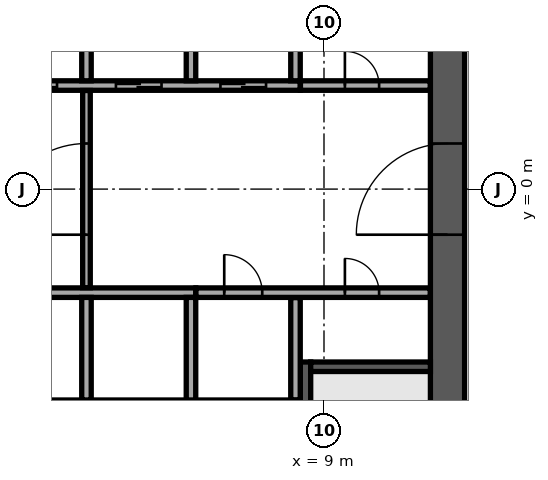
"""IFC4 building model, lengths in metres.
Left out: names, types, materials, properties, quantities, classifications, styles, units other than length and angle.
Written with IfcOpenShell. Run it as: python <this file> out.ifc"""

import sys

from ifc_helpers import new_model, si_unit, direction, frame, frame_2d, origin, place, context, subcontext, project, spatial, rectangle, extrude, element, fill, save


model = new_model("IFC4")
c1 = context("Model", 3, precision=1e-05, world=origin(), true_north=direction((0.0, 1.0)))
c2 = subcontext(c1, "Body", "Model", "MODEL_VIEW")
j1 = project(units=[si_unit("LENGTHUNIT", "METRE"), si_unit("PLANEANGLEUNIT", "RADIAN")], contexts=[c1])
p1 = place(None, origin())
s1 = spatial("IfcSite", under=j1, at=p1, CompositionType="ELEMENT")
p2 = place(p1, origin())
s2 = spatial("IfcBuilding", under=s1, at=p2, CompositionType="ELEMENT")
p3 = place(p2, frame((0.0, 0.0, 205.3)))
s3 = spatial("IfcBuildingStorey", under=s2, at=p3, CompositionType="ELEMENT", Elevation=205.3)
p4 = place(p3, frame((12.25, -11.8, 0.0), z_axis=(0.0, 0.0, 1.0), x_axis=(0.0, 1.0, 0.0)))
e1 = element("IfcWall", 1, at=p4, inside=s3, PredefinedType="SHEAR", context=c2, shape_type="SweptSolid", body=[
    extrude(rectangle(XDim=23.6, YDim=0.9, at=frame_2d((11.8, 0.0))), origin(), (0.0, 0.0, 1.0), 3.62),
])
p5 = place(p4, frame((10.6, 0.0, 0.0)))
e2 = element("IfcOpeningElement", 2, at=p5, cuts=e1, PredefinedType="OPENING", context=c2, shape_type="SweptSolid", body=[
    extrude(rectangle(XDim=2.4, YDim=2.4, at=frame_2d((1.2, 1.2))), frame((0.0, 0.46, 0.0), z_axis=(0.0, -1.0, 0.0), x_axis=(1.0, 0.0, 0.0)), (0.0, 0.0, 1.0), 0.92),
])
p6 = place(p3, frame((-2.875, -5.7, 0.0), z_axis=(0.0, 0.0, 1.0), x_axis=(1.0, 0.0, 0.0)))
e3 = element("IfcWall", 3, at=p6, inside=s3, PredefinedType="SOLIDWALL", context=c2, shape_type="SweptSolid", body=[
    extrude(rectangle(XDim=11.25, YDim=0.3, at=frame_2d((5.625, 0.0))), origin(), (0.0, 0.0, 1.0), 3.62),
])
p7 = place(p3, frame((-8.375, 2.725, 0.0), z_axis=(0.0, 0.0, 1.0), x_axis=(1.0, 0.0, 0.0)))
e4 = element("IfcWall", 4, at=p7, inside=s3, PredefinedType="SOLIDWALL", context=c2, shape_type="SweptSolid", body=[
    extrude(rectangle(XDim=16.75, YDim=0.25, at=frame_2d((8.375, 0.0))), origin(), (0.0, 0.0, 1.0), 3.62),
])
p8 = place(p7, frame((0.9, 0.0, 0.0)))
e5 = element("IfcOpeningElement", 5, at=p8, cuts=e4, PredefinedType="OPENING", context=c2, shape_type="SweptSolid", body=[
    extrude(rectangle(XDim=1.2, YDim=2.1, at=frame_2d((0.6, 1.05))), frame((0.0, 0.135, 0.0), z_axis=(0.0, -1.0, 0.0), x_axis=(1.0, 0.0, 0.0)), (0.0, 0.0, 1.0), 0.27),
])
p9 = place(p7, frame((3.65, 0.0, 0.0)))
e6 = element("IfcOpeningElement", 6, at=p9, cuts=e4, PredefinedType="OPENING", context=c2, shape_type="SweptSolid", body=[
    extrude(rectangle(XDim=1.2, YDim=2.1, at=frame_2d((0.6, 1.05))), frame((0.0, 0.135, 0.0), z_axis=(0.0, -1.0, 0.0), x_axis=(1.0, 0.0, 0.0)), (0.0, 0.0, 1.0), 0.27),
])
p10 = place(p7, frame((6.4, 0.0, 0.0)))
e7 = element("IfcOpeningElement", 7, at=p10, cuts=e4, PredefinedType="OPENING", context=c2, shape_type="SweptSolid", body=[
    extrude(rectangle(XDim=1.2, YDim=2.1, at=frame_2d((0.6, 1.05))), frame((0.0, 0.135, 0.0), z_axis=(0.0, -1.0, 0.0), x_axis=(1.0, 0.0, 0.0)), (0.0, 0.0, 1.0), 0.27),
])
p11 = place(p7, frame((9.15, 0.0, 0.0)))
e8 = element("IfcOpeningElement", 8, at=p11, cuts=e4, PredefinedType="OPENING", context=c2, shape_type="SweptSolid", body=[
    extrude(rectangle(XDim=1.2, YDim=2.1, at=frame_2d((0.6, 1.05))), frame((0.0, 0.135, 0.0), z_axis=(0.0, -1.0, 0.0), x_axis=(1.0, 0.0, 0.0)), (0.0, 0.0, 1.0), 0.27),
])
p12 = place(p7, frame((11.9, 0.0, 0.0)))
e9 = element("IfcOpeningElement", 9, at=p12, cuts=e4, PredefinedType="OPENING", context=c2, shape_type="SweptSolid", body=[
    extrude(rectangle(XDim=1.2, YDim=2.1, at=frame_2d((0.6, 1.05))), frame((0.0, 0.135, 0.0), z_axis=(0.0, -1.0, 0.0), x_axis=(1.0, 0.0, 0.0)), (0.0, 0.0, 1.0), 0.27),
])
p13 = place(p7, frame((14.65, 0.0, 0.0)))
e10 = element("IfcOpeningElement", 10, at=p13, cuts=e4, PredefinedType="OPENING", context=c2, shape_type="SweptSolid", body=[
    extrude(rectangle(XDim=1.2, YDim=2.1, at=frame_2d((0.6, 1.05))), frame((0.0, 0.135, 0.0), z_axis=(0.0, -1.0, 0.0), x_axis=(1.0, 0.0, 0.0)), (0.0, 0.0, 1.0), 0.27),
])
for number, where, z_axis, x_axis in (
    (11, (2.75, 2.85, 0.0), (0.0, 0.0, 1.0), (0.0, 1.0, 0.0)),
    (12, (5.5, 2.85, 0.0), (0.0, 0.0, 1.0), (0.0, 1.0, 0.0)),
    (13, (8.25, 2.85, 0.0), (0.0, 0.0, 1.0), (0.0, 1.0, 0.0)),
):
    element("IfcWall", number, at=place(p3, frame(where, z_axis=z_axis, x_axis=x_axis)), inside=s3, PredefinedType="SOLIDWALL", context=c2, shape_type="SweptSolid", body=[
        extrude(rectangle(XDim=2.7, YDim=0.25, at=frame_2d((1.35, 0.0))), origin(), (0.0, 0.0, 1.0), 3.62),
    ])
p14 = place(p3, frame((-2.875, -2.725, 0.0), z_axis=(0.0, 0.0, 1.0), x_axis=(1.0, 0.0, 0.0)))
e14 = element("IfcWall", 14, at=p14, inside=s3, PredefinedType="SOLIDWALL", context=c2, shape_type="SweptSolid", body=[
    extrude(rectangle(XDim=8.5, YDim=0.25, at=frame_2d((4.25, 0.0))), origin(), (0.0, 0.0, 1.0), 3.62),
])
for number, where, z_axis, x_axis in (
    (15, (2.75, -5.55, 0.0), (0.0, 0.0, 1.0), (0.0, 1.0, 0.0)),
    (16, (5.5, -5.55, 0.0), (0.0, 0.0, 1.0), (0.0, 1.0, 0.0)),
):
    element("IfcWall", number, at=place(p3, frame(where, z_axis=z_axis, x_axis=x_axis)), inside=s3, PredefinedType="SOLIDWALL", context=c2, shape_type="SweptSolid", body=[
        extrude(rectangle(XDim=2.7, YDim=0.25, at=frame_2d((1.35, 0.0))), origin(), (0.0, 0.0, 1.0), 3.62),
    ])
p15 = place(p3, frame((8.512, -4.55, 0.0), z_axis=(0.0, 0.0, 1.0), x_axis=(0.0, -1.0, 0.0)))
e17 = element("IfcWall", 17, at=p15, inside=s3, PredefinedType="SOLIDWALL", context=c2, shape_type="SweptSolid", body=[
    extrude(rectangle(XDim=7.25, YDim=0.275, at=frame_2d((3.625, 0.0))), origin(), (0.0, 0.0, 1.0), 3.62),
])
p16 = place(p15, frame((6.0, 0.0, 0.0)))
e18 = element("IfcOpeningElement", 18, at=p16, cuts=e17, PredefinedType="OPENING", context=c2, shape_type="SweptSolid", body=[
    extrude(rectangle(XDim=1.0, YDim=2.1, at=frame_2d((0.5, 1.05))), frame((0.0, 0.147, 0.0), z_axis=(0.0, -1.0, 0.0), x_axis=(1.0, 0.0, 0.0)), (0.0, 0.0, 1.0), 0.295),
])
p17 = place(p3, frame((8.65, -4.675, 0.0), z_axis=(0.0, 0.0, 1.0), x_axis=(1.0, 0.0, 0.0)))
e19 = element("IfcWall", 19, at=p17, inside=s3, PredefinedType="SOLIDWALL", context=c2, shape_type="SweptSolid", body=[
    extrude(rectangle(XDim=3.15, YDim=0.25, at=frame_2d((1.575, 0.0))), origin(), (0.0, 0.0, 1.0), 3.62),
])
p18 = place(p3, frame((8.25, -5.545, 0.0), z_axis=(0.0, 0.0, 1.0), x_axis=(0.0, 1.0, 0.0)))
e20 = element("IfcWall", 20, at=p18, inside=s3, PredefinedType="PARTITIONING", context=c2, shape_type="SweptSolid", body=[
    extrude(rectangle(XDim=2.69, YDim=0.25, at=frame_2d((1.345, 0.0))), origin(), (0.0, 0.0, 1.0), 3.62),
])
p19 = place(p3, frame((5.63, -2.725, 0.0), z_axis=(0.0, 0.0, 1.0), x_axis=(1.0, 0.0, 0.0)))
e21 = element("IfcWall", 21, at=p19, inside=s3, PredefinedType="PARTITIONING", context=c2, shape_type="SweptSolid", body=[
    extrude(rectangle(XDim=6.165, YDim=0.25, at=frame_2d((3.083, 0.0))), origin(), (0.0, 0.0, 1.0), 3.62),
])
p20 = place(p19, frame((0.745, 0.0, 0.0)))
e22 = element("IfcOpeningElement", 22, at=p20, cuts=e21, PredefinedType="OPENING", context=c2, shape_type="SweptSolid", body=[
    extrude(rectangle(XDim=1.0, YDim=2.1, at=frame_2d((0.5, 1.05))), frame((0.0, 0.135, 0.0), z_axis=(0.0, -1.0, 0.0), x_axis=(1.0, 0.0, 0.0)), (0.0, 0.0, 1.0), 0.27),
])
p21 = place(p19, frame((3.92, 0.0, 0.0)))
e23 = element("IfcOpeningElement", 23, at=p21, cuts=e21, PredefinedType="OPENING", context=c2, shape_type="SweptSolid", body=[
    extrude(rectangle(XDim=0.9, YDim=2.1, at=frame_2d((0.45, 1.05))), frame((0.0, 0.135, 0.0), z_axis=(0.0, -1.0, 0.0), x_axis=(1.0, 0.0, 0.0)), (0.0, 0.0, 1.0), 0.27),
])
p22 = place(p3, frame((2.75, -2.595, 0.0), z_axis=(0.0, 0.0, 1.0), x_axis=(0.0, 1.0, 0.0)))
e24 = element("IfcWall", 24, at=p22, inside=s3, PredefinedType="PARTITIONING", context=c2, shape_type="SweptSolid", body=[
    extrude(rectangle(XDim=5.19, YDim=0.2, at=frame_2d((2.595, 0.0))), origin(), (0.0, 0.0, 1.0), 3.62),
])
p23 = place(p22, frame((1.395, 0.0, 0.0)))
e25 = element("IfcOpeningElement", 25, at=p23, cuts=e24, PredefinedType="OPENING", context=c2, shape_type="SweptSolid", body=[
    extrude(rectangle(XDim=2.4, YDim=2.4, at=frame_2d((1.2, 1.2))), frame((0.0, 0.11, 0.0), z_axis=(0.0, -1.0, 0.0), x_axis=(1.0, 0.0, 0.0)), (0.0, 0.0, 1.0), 0.22),
])
p24 = place(p3, frame((8.38, 2.725, 0.0), z_axis=(0.0, 0.0, 1.0), x_axis=(1.0, 0.0, 0.0)))
e26 = element("IfcWall", 26, at=p24, inside=s3, PredefinedType="PARTITIONING", context=c2, shape_type="SweptSolid", body=[
    extrude(rectangle(XDim=3.415, YDim=0.25, at=frame_2d((1.708, 0.0))), origin(), (0.0, 0.0, 1.0), 3.62),
])
p25 = place(p24, frame((1.17, 0.0, 0.0)))
e27 = element("IfcOpeningElement", 27, at=p25, cuts=e26, PredefinedType="OPENING", context=c2, shape_type="SweptSolid", body=[
    extrude(rectangle(XDim=0.9, YDim=2.1, at=frame_2d((0.45, 1.05))), frame((0.0, 0.135, 0.0), z_axis=(0.0, -1.0, 0.0), x_axis=(1.0, 0.0, 0.0)), (0.0, 0.0, 1.0), 0.27),
])
p26 = place(p3, frame((0.749, -34.782, 0.0), z_axis=(0.0, 0.0, 1.0), x_axis=(0.694657553534, 0.719340589233, 0.0)))
e28 = element("IfcWall", 28, at=p26, inside=s3, PredefinedType="STANDARD", context=c2, shape_type="SweptSolid", body=[
    extrude(rectangle(XDim=49.0, YDim=0.6, at=frame_2d((24.5, 0.0))), origin(), (0.0, 0.0, 1.0), 3.62),
])
p27 = place(p26, frame((1.227, 0.0, 0.9)))
e29 = element("IfcOpeningElement", 29, at=p27, cuts=e28, PredefinedType="OPENING", context=c2, shape_type="SweptSolid", body=[
    extrude(rectangle(XDim=2.0, YDim=2.1, at=frame_2d((1.0, 1.05))), frame((0.0, 0.31, 0.0), z_axis=(0.0, -1.0, 0.0), x_axis=(1.0, 0.0, 0.0)), (0.0, 0.0, 1.0), 0.62),
])
p28 = place(p26, frame((5.682, 0.0, 0.9)))
e30 = element("IfcOpeningElement", 30, at=p28, cuts=e28, PredefinedType="OPENING", context=c2, shape_type="SweptSolid", body=[
    extrude(rectangle(XDim=2.0, YDim=2.1, at=frame_2d((1.0, 1.05))), frame((0.0, 0.31, 0.0), z_axis=(0.0, -1.0, 0.0), x_axis=(1.0, 0.0, 0.0)), (0.0, 0.0, 1.0), 0.62),
])
p29 = place(p26, frame((10.136, 0.0, 0.9)))
e31 = element("IfcOpeningElement", 31, at=p29, cuts=e28, PredefinedType="OPENING", context=c2, shape_type="SweptSolid", body=[
    extrude(rectangle(XDim=2.0, YDim=2.1, at=frame_2d((1.0, 1.05))), frame((0.0, 0.31, 0.0), z_axis=(0.0, -1.0, 0.0), x_axis=(1.0, 0.0, 0.0)), (0.0, 0.0, 1.0), 0.62),
])
p30 = place(p26, frame((14.591, 0.0, 0.9)))
e32 = element("IfcOpeningElement", 32, at=p30, cuts=e28, PredefinedType="OPENING", context=c2, shape_type="SweptSolid", body=[
    extrude(rectangle(XDim=2.0, YDim=2.1, at=frame_2d((1.0, 1.05))), frame((0.0, 0.31, 0.0), z_axis=(0.0, -1.0, 0.0), x_axis=(1.0, 0.0, 0.0)), (0.0, 0.0, 1.0), 0.62),
])
p31 = place(p26, frame((19.045, 0.0, 0.9)))
e33 = element("IfcOpeningElement", 33, at=p31, cuts=e28, PredefinedType="OPENING", context=c2, shape_type="SweptSolid", body=[
    extrude(rectangle(XDim=2.0, YDim=2.1, at=frame_2d((1.0, 1.05))), frame((0.0, 0.31, 0.0), z_axis=(0.0, -1.0, 0.0), x_axis=(1.0, 0.0, 0.0)), (0.0, 0.0, 1.0), 0.62),
])
p32 = place(p26, frame((23.5, 0.0, 0.9)))
e34 = element("IfcOpeningElement", 34, at=p32, cuts=e28, PredefinedType="OPENING", context=c2, shape_type="SweptSolid", body=[
    extrude(rectangle(XDim=2.0, YDim=2.1, at=frame_2d((1.0, 1.05))), frame((0.0, 0.31, 0.0), z_axis=(0.0, -1.0, 0.0), x_axis=(1.0, 0.0, 0.0)), (0.0, 0.0, 1.0), 0.62),
])
p33 = place(p26, frame((27.955, 0.0, 0.9)))
e35 = element("IfcOpeningElement", 35, at=p33, cuts=e28, PredefinedType="OPENING", context=c2, shape_type="SweptSolid", body=[
    extrude(rectangle(XDim=2.0, YDim=2.1, at=frame_2d((1.0, 1.05))), frame((0.0, 0.31, 0.0), z_axis=(0.0, -1.0, 0.0), x_axis=(1.0, 0.0, 0.0)), (0.0, 0.0, 1.0), 0.62),
])
p34 = place(p26, frame((32.409, 0.0, 0.9)))
e36 = element("IfcOpeningElement", 36, at=p34, cuts=e28, PredefinedType="OPENING", context=c2, shape_type="SweptSolid", body=[
    extrude(rectangle(XDim=2.0, YDim=2.1, at=frame_2d((1.0, 1.05))), frame((0.0, 0.31, 0.0), z_axis=(0.0, -1.0, 0.0), x_axis=(1.0, 0.0, 0.0)), (0.0, 0.0, 1.0), 0.62),
])
p35 = place(p26, frame((36.864, 0.0, 0.9)))
e37 = element("IfcOpeningElement", 37, at=p35, cuts=e28, PredefinedType="OPENING", context=c2, shape_type="SweptSolid", body=[
    extrude(rectangle(XDim=2.0, YDim=2.1, at=frame_2d((1.0, 1.05))), frame((0.0, 0.31, 0.0), z_axis=(0.0, -1.0, 0.0), x_axis=(1.0, 0.0, 0.0)), (0.0, 0.0, 1.0), 0.62),
])
p36 = place(p26, frame((41.318, 0.0, 0.9)))
e38 = element("IfcOpeningElement", 38, at=p36, cuts=e28, PredefinedType="OPENING", context=c2, shape_type="SweptSolid", body=[
    extrude(rectangle(XDim=2.0, YDim=2.1, at=frame_2d((1.0, 1.05))), frame((0.0, 0.31, 0.0), z_axis=(0.0, -1.0, 0.0), x_axis=(1.0, 0.0, 0.0)), (0.0, 0.0, 1.0), 0.62),
])
p37 = place(p26, frame((45.773, 0.0, 0.9)))
e39 = element("IfcOpeningElement", 39, at=p37, cuts=e28, PredefinedType="OPENING", context=c2, shape_type="SweptSolid", body=[
    extrude(rectangle(XDim=2.0, YDim=2.1, at=frame_2d((1.0, 1.05))), frame((0.0, 0.31, 0.0), z_axis=(0.0, -1.0, 0.0), x_axis=(1.0, 0.0, 0.0)), (0.0, 0.0, 1.0), 0.62),
])
p38 = place(p3, frame((0.977, -26.89, 0.0), z_axis=(0.0, 0.0, 1.0), x_axis=(0.694659509326, 0.719338700546, 0.0)))
e40 = element("IfcWall", 40, at=p38, inside=s3, PredefinedType="PARTITIONING", context=c2, shape_type="SweptSolid", body=[
    extrude(rectangle(XDim=37.404, YDim=0.15, at=frame_2d((18.702, 0.0))), origin(), (0.0, 0.0, 1.0), 3.17),
])
p39 = place(p38, frame((10.017, 0.0, 0.0)))
e41 = element("IfcOpeningElement", 41, at=p39, cuts=e40, PredefinedType="OPENING", context=c2, shape_type="SweptSolid", body=[
    extrude(rectangle(XDim=1.0, YDim=2.1, at=frame_2d((0.5, 1.05))), frame((0.0, 0.085, 0.0), z_axis=(0.0, -1.0, 0.0), x_axis=(1.0, 0.0, 0.0)), (0.0, 0.0, 1.0), 0.17),
])
p40 = place(p38, frame((16.416, 0.0, 0.0)))
e42 = element("IfcOpeningElement", 42, at=p40, cuts=e40, PredefinedType="OPENING", context=c2, shape_type="SweptSolid", body=[
    extrude(rectangle(XDim=1.0, YDim=2.1, at=frame_2d((0.5, 1.05))), frame((0.0, 0.085, 0.0), z_axis=(0.0, -1.0, 0.0), x_axis=(1.0, 0.0, 0.0)), (0.0, 0.0, 1.0), 0.17),
])
p41 = place(p38, frame((25.838, 0.0, 0.0)))
e43 = element("IfcOpeningElement", 43, at=p41, cuts=e40, PredefinedType="OPENING", context=c2, shape_type="SweptSolid", body=[
    extrude(rectangle(XDim=1.0, YDim=2.1, at=frame_2d((0.5, 1.05))), frame((0.0, 0.085, 0.0), z_axis=(0.0, -1.0, 0.0), x_axis=(1.0, 0.0, 0.0)), (0.0, 0.0, 1.0), 0.17),
])
p42 = place(p38, frame((31.566, 0.0, 0.0)))
e44 = element("IfcOpeningElement", 44, at=p42, cuts=e40, PredefinedType="OPENING", context=c2, shape_type="SweptSolid", body=[
    extrude(rectangle(XDim=1.0, YDim=2.1, at=frame_2d((0.5, 1.05))), frame((0.0, 0.085, 0.0), z_axis=(0.0, -1.0, 0.0), x_axis=(1.0, 0.0, 0.0)), (0.0, 0.0, 1.0), 0.17),
])
p43 = place(p5, origin())
e45 = element("IfcDoor", 45, at=p43, inside=s3, OperationType="SINGLE_SWING_LEFT", PredefinedType="DOOR", context=c2, shape_type="SweptSolid", body=[
    extrude(rectangle(XDim=2.4, YDim=2.4, at=frame_2d((1.2, 1.2))), frame((0.0, 0.025, 0.0), z_axis=(0.0, -1.0, 0.0), x_axis=(1.0, 0.0, 0.0)), (0.0, 0.0, 1.0), 0.05),
])
fill(e2, e45)
p44 = place(p11, origin())
e46 = element("IfcDoor", 46, at=p44, inside=s3, OperationType="DOUBLE_DOOR_SLIDING", PredefinedType="DOOR", context=c2, shape_type="SweptSolid", body=[
    extrude(rectangle(XDim=1.2, YDim=2.1, at=frame_2d((0.6, 1.05))), frame((0.0, 0.025, 0.0), z_axis=(0.0, -1.0, 0.0), x_axis=(1.0, 0.0, 0.0)), (0.0, 0.0, 1.0), 0.05),
])
fill(e8, e46)
p45 = place(p12, origin())
e47 = element("IfcDoor", 47, at=p45, inside=s3, OperationType="DOUBLE_DOOR_SLIDING", PredefinedType="DOOR", context=c2, shape_type="SweptSolid", body=[
    extrude(rectangle(XDim=1.2, YDim=2.1, at=frame_2d((0.6, 1.05))), frame((0.0, 0.025, 0.0), z_axis=(0.0, -1.0, 0.0), x_axis=(1.0, 0.0, 0.0)), (0.0, 0.0, 1.0), 0.05),
])
fill(e9, e47)
p46 = place(p13, origin())
e48 = element("IfcDoor", 48, at=p46, inside=s3, OperationType="DOUBLE_DOOR_SLIDING", PredefinedType="DOOR", context=c2, shape_type="SweptSolid", body=[
    extrude(rectangle(XDim=1.2, YDim=2.1, at=frame_2d((0.6, 1.05))), frame((0.0, 0.025, 0.0), z_axis=(0.0, -1.0, 0.0), x_axis=(1.0, 0.0, 0.0)), (0.0, 0.0, 1.0), 0.05),
])
fill(e10, e48)
p47 = place(p20, origin())
e49 = element("IfcDoor", 49, at=p47, inside=s3, OperationType="SINGLE_SWING_LEFT", PredefinedType="DOOR", context=c2, shape_type="SweptSolid", body=[
    extrude(rectangle(XDim=1.0, YDim=2.1, at=frame_2d((0.5, 1.05))), frame((0.0, 0.025, 0.0), z_axis=(0.0, -1.0, 0.0), x_axis=(1.0, 0.0, 0.0)), (0.0, 0.0, 1.0), 0.05),
])
fill(e22, e49)
p48 = place(p25, origin())
e50 = element("IfcDoor", 50, at=p48, inside=s3, OperationType="SINGLE_SWING_LEFT", PredefinedType="DOOR", context=c2, shape_type="SweptSolid", body=[
    extrude(rectangle(XDim=0.9, YDim=2.1, at=frame_2d((0.45, 1.05))), frame((0.0, 0.025, 0.0), z_axis=(0.0, -1.0, 0.0), x_axis=(1.0, 0.0, 0.0)), (0.0, 0.0, 1.0), 0.05),
])
fill(e27, e50)
p49 = place(p21, origin())
e51 = element("IfcDoor", 51, at=p49, inside=s3, OperationType="SINGLE_SWING_LEFT", PredefinedType="DOOR", context=c2, shape_type="SweptSolid", body=[
    extrude(rectangle(XDim=0.9, YDim=2.1, at=frame_2d((0.45, 1.05))), frame((0.0, 0.025, 0.0), z_axis=(0.0, -1.0, 0.0), x_axis=(1.0, 0.0, 0.0)), (0.0, 0.0, 1.0), 0.05),
])
fill(e23, e51)
p50 = place(p23, origin())
e52 = element("IfcDoor", 52, at=p50, inside=s3, OperationType="SINGLE_SWING_LEFT", PredefinedType="DOOR", context=c2, shape_type="SweptSolid", body=[
    extrude(rectangle(XDim=2.4, YDim=2.4, at=frame_2d((1.2, 1.2))), frame((0.0, 0.025, 0.0), z_axis=(0.0, -1.0, 0.0), x_axis=(1.0, 0.0, 0.0)), (0.0, 0.0, 1.0), 0.05),
])
fill(e25, e52)
save(model, sys.argv[1])
